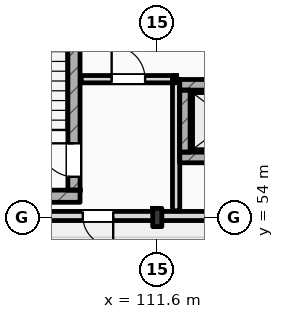
"""IFC4 building model, lengths in metres.
Left out: names, types, materials, properties, quantities, classifications, styles, units other than length and angle.
Written with IfcOpenShell. Run it as: python <this file> out.ifc"""

import sys

from ifc_helpers import new_model, si_unit, direction, frame, frame_2d, origin, origin_2d, place, context, subcontext, project, spatial, rectangle, i_section, extrude, element, fill, save


model = new_model("IFC4")
c1 = context("Model", 3, precision=1e-05, world=origin(), true_north=direction((0.0, 1.0)))
c2 = subcontext(c1, "Body", "Model", "MODEL_VIEW")
j1 = project(units=[si_unit("LENGTHUNIT", "METRE"), si_unit("PLANEANGLEUNIT", "RADIAN")], contexts=[c1])
p1 = place(None, origin())
s1 = spatial("IfcSite", under=j1, at=p1, CompositionType="ELEMENT")
p2 = place(p1, origin())
s2 = spatial("IfcBuilding", under=s1, at=p2, CompositionType="ELEMENT")
p3 = place(p2, origin())
s3 = spatial("IfcBuildingStorey", under=s2, at=p3, CompositionType="ELEMENT", Elevation=0.0)
p4 = place(p3, frame((111.6, 54.0, 0.0), z_axis=(0.0, 0.0, 1.0), x_axis=(1.0, 0.0, 0.0)))
e1 = element("IfcColumn", 1, at=p4, inside=s3, PredefinedType="COLUMN", context=c2, shape_type="SweptSolid", body=[
    extrude(i_section(OverallWidth=0.3, OverallDepth=0.6, WebThickness=0.015, FlangeThickness=0.03, FilletRadius=0.027, at=origin_2d()), origin(), (0.0, 0.0, 1.0), 6.0),
])
p5 = place(p3, frame((104.1, 54.7, 0.0), z_axis=(0.0, 0.0, 1.0), x_axis=(1.0, 0.0, 0.0)))
e2 = element("IfcWall", 2, at=p5, inside=s3, PredefinedType="SHEAR", context=c2, shape_type="SweptSolid", body=[
    extrude(rectangle(XDim=4.96, YDim=0.4, at=frame_2d((2.48, 0.0))), origin(), (0.0, 0.0, 1.0), 6.0),
])
p6 = place(p3, frame((108.86, 54.9, 0.0), z_axis=(0.0, 0.0, 1.0), x_axis=(0.0, 1.0, 0.0)))
e3 = element("IfcWall", 3, at=p6, inside=s3, PredefinedType="SHEAR", context=c2, shape_type="SweptSolid", body=[
    extrude(rectangle(XDim=9.112, YDim=0.4, at=frame_2d((4.556, 0.0))), origin(), (0.0, 0.0, 1.0), 6.0),
])
p7 = place(p6, frame((0.44, 0.0, 0.0)))
e4 = element("IfcOpeningElement", 4, at=p7, cuts=e3, PredefinedType="OPENING", context=c2, shape_type="SweptSolid", body=[
    extrude(rectangle(XDim=1.1, YDim=2.2, at=frame_2d((0.55, 1.1))), frame((0.0, 0.21, 0.0), z_axis=(0.0, -1.0, 0.0), x_axis=(1.0, 0.0, 0.0)), (0.0, 0.0, 1.0), 0.42),
])
p8 = place(p3, frame((103.2, 54.05, 0.0), z_axis=(0.0, 0.0, 1.0), x_axis=(1.0, 0.0, 0.0)))
e5 = element("IfcWall", 5, at=p8, inside=s3, PredefinedType="STANDARD", context=c2, shape_type="SweptSolid", body=[
    extrude(rectangle(XDim=25.15, YDim=0.3, at=frame_2d((12.575, 0.0))), origin(), (0.0, 0.0, 1.0), 5.14),
])
p9 = place(p8, frame((5.95, 0.0, 0.0)))
e6 = element("IfcOpeningElement", 6, at=p9, cuts=e5, PredefinedType="OPENING", context=c2, shape_type="SweptSolid", body=[
    extrude(rectangle(XDim=1.0, YDim=2.15, at=frame_2d((0.5, 1.075))), frame((0.0, 0.16, 0.0), z_axis=(0.0, -1.0, 0.0), x_axis=(1.0, 0.0, 0.0)), (0.0, 0.0, 1.0), 0.32),
])
p10 = place(p8, frame((18.2, 0.0, 0.0)))
e7 = element("IfcOpeningElement", 7, at=p10, cuts=e5, PredefinedType="OPENING", context=c2, shape_type="SweptSolid", body=[
    extrude(rectangle(XDim=1.8, YDim=2.4, at=frame_2d((0.9, 1.2))), frame((0.0, 0.16, 0.0), z_axis=(0.0, -1.0, 0.0), x_axis=(1.0, 0.0, 0.0)), (0.0, 0.0, 1.0), 0.32),
])
p11 = place(p3, frame((112.33, 58.365, 0.0), z_axis=(0.0, 0.0, 1.0), x_axis=(1.0, 0.0, 0.0)))
e8 = element("IfcWall", 8, at=p11, inside=s3, PredefinedType="SHEAR", context=c2, shape_type="SweptSolid", body=[
    extrude(rectangle(XDim=3.34, YDim=0.35, at=frame_2d((1.67, 0.0))), origin(), (0.0, 0.0, 1.0), 5.7),
])
p12 = place(p11, frame((1.045, 0.0, 0.0)))
e9 = element("IfcOpeningElement", 9, at=p12, cuts=e8, PredefinedType="OPENING", context=c2, shape_type="SweptSolid", body=[
    extrude(rectangle(XDim=1.25, YDim=2.25, at=frame_2d((0.625, 1.125))), frame((0.0, 0.185, 0.0), z_axis=(0.0, -1.0, 0.0), x_axis=(1.0, 0.0, 0.0)), (0.0, 0.0, 1.0), 0.37),
])
p13 = place(p3, frame((112.33, 55.975, 0.0), z_axis=(0.0, 0.0, 1.0), x_axis=(1.0, 0.0, 0.0)))
e10 = element("IfcWall", 10, at=p13, inside=s3, PredefinedType="SHEAR", context=c2, shape_type="SweptSolid", body=[
    extrude(rectangle(XDim=3.34, YDim=0.35, at=frame_2d((1.67, 0.0))), origin(), (0.0, 0.0, 1.0), 5.7),
])
p14 = place(p3, frame((112.505, 56.15, 0.0), z_axis=(0.0, 0.0, 1.0), x_axis=(0.0, 1.0, 0.0)))
e11 = element("IfcWall", 11, at=p14, inside=s3, PredefinedType="SHEAR", context=c2, shape_type="SweptSolid", body=[
    extrude(rectangle(XDim=2.04, YDim=0.35, at=frame_2d((1.02, 0.0))), origin(), (0.0, 0.0, 1.0), 5.7),
])
p15 = place(p3, frame((112.22, 54.22, 0.0), z_axis=(0.0, 0.0, 1.0), x_axis=(0.0, 1.0, 0.0)))
e12 = element("IfcWall", 12, at=p15, inside=s3, PredefinedType="STANDARD", context=c2, shape_type="SweptSolid", body=[
    extrude(rectangle(XDim=4.33, YDim=0.24, at=frame_2d((2.165, 0.0))), origin(), (0.0, 0.0, 1.0), 5.7),
])
p16 = place(p3, frame((109.1, 58.55, 0.0), z_axis=(0.0, 0.0, 1.0), x_axis=(1.0, 0.0, 0.0)))
e13 = element("IfcWall", 13, at=p16, inside=s3, PredefinedType="STANDARD", context=c2, shape_type="SweptSolid", body=[
    extrude(rectangle(XDim=3.12, YDim=0.24, at=frame_2d((1.56, 0.0))), origin(), (0.0, 0.0, 1.0), 5.7),
])
p17 = place(p16, frame((1.0, 0.0, 0.0)))
e14 = element("IfcOpeningElement", 14, at=p17, cuts=e13, PredefinedType="OPENING", context=c2, shape_type="SweptSolid", body=[
    extrude(rectangle(XDim=1.1, YDim=2.2, at=frame_2d((0.55, 1.1))), frame((0.0, 0.13, 0.0), z_axis=(0.0, -1.0, 0.0), x_axis=(1.0, 0.0, 0.0)), (0.0, 0.0, 1.0), 0.26),
])
p18 = place(p9, frame((1.0, 0.0, 0.0), z_axis=(0.0, 0.0, 1.0), x_axis=(-1.0, 0.0, 0.0)))
e15 = element("IfcDoor", 15, at=p18, inside=s3, OperationType="SINGLE_SWING_RIGHT", PredefinedType="DOOR", context=c2, shape_type="SweptSolid", body=[
    extrude(rectangle(XDim=1.0, YDim=2.15, at=frame_2d((0.5, 1.075))), frame((0.0, 0.025, 0.0), z_axis=(0.0, -1.0, 0.0), x_axis=(1.0, 0.0, 0.0)), (0.0, 0.0, 1.0), 0.05),
])
fill(e6, e15)
p19 = place(p7, origin())
e16 = element("IfcDoor", 16, at=p19, inside=s3, OperationType="SINGLE_SWING_RIGHT", PredefinedType="DOOR", context=c2, shape_type="SweptSolid", body=[
    extrude(rectangle(XDim=1.1, YDim=2.2, at=frame_2d((0.55, 1.1))), frame((0.0, 0.025, 0.0), z_axis=(0.0, -1.0, 0.0), x_axis=(1.0, 0.0, 0.0)), (0.0, 0.0, 1.0), 0.05),
])
fill(e4, e16)
p20 = place(p17, origin())
e17 = element("IfcDoor", 17, at=p20, inside=s3, OperationType="SINGLE_SWING_LEFT", PredefinedType="DOOR", context=c2, shape_type="SweptSolid", body=[
    extrude(rectangle(XDim=1.1, YDim=2.2, at=frame_2d((0.55, 1.1))), frame((0.0, 0.025, 0.0), z_axis=(0.0, -1.0, 0.0), x_axis=(1.0, 0.0, 0.0)), (0.0, 0.0, 1.0), 0.05),
])
fill(e14, e17)
save(model, sys.argv[1])
